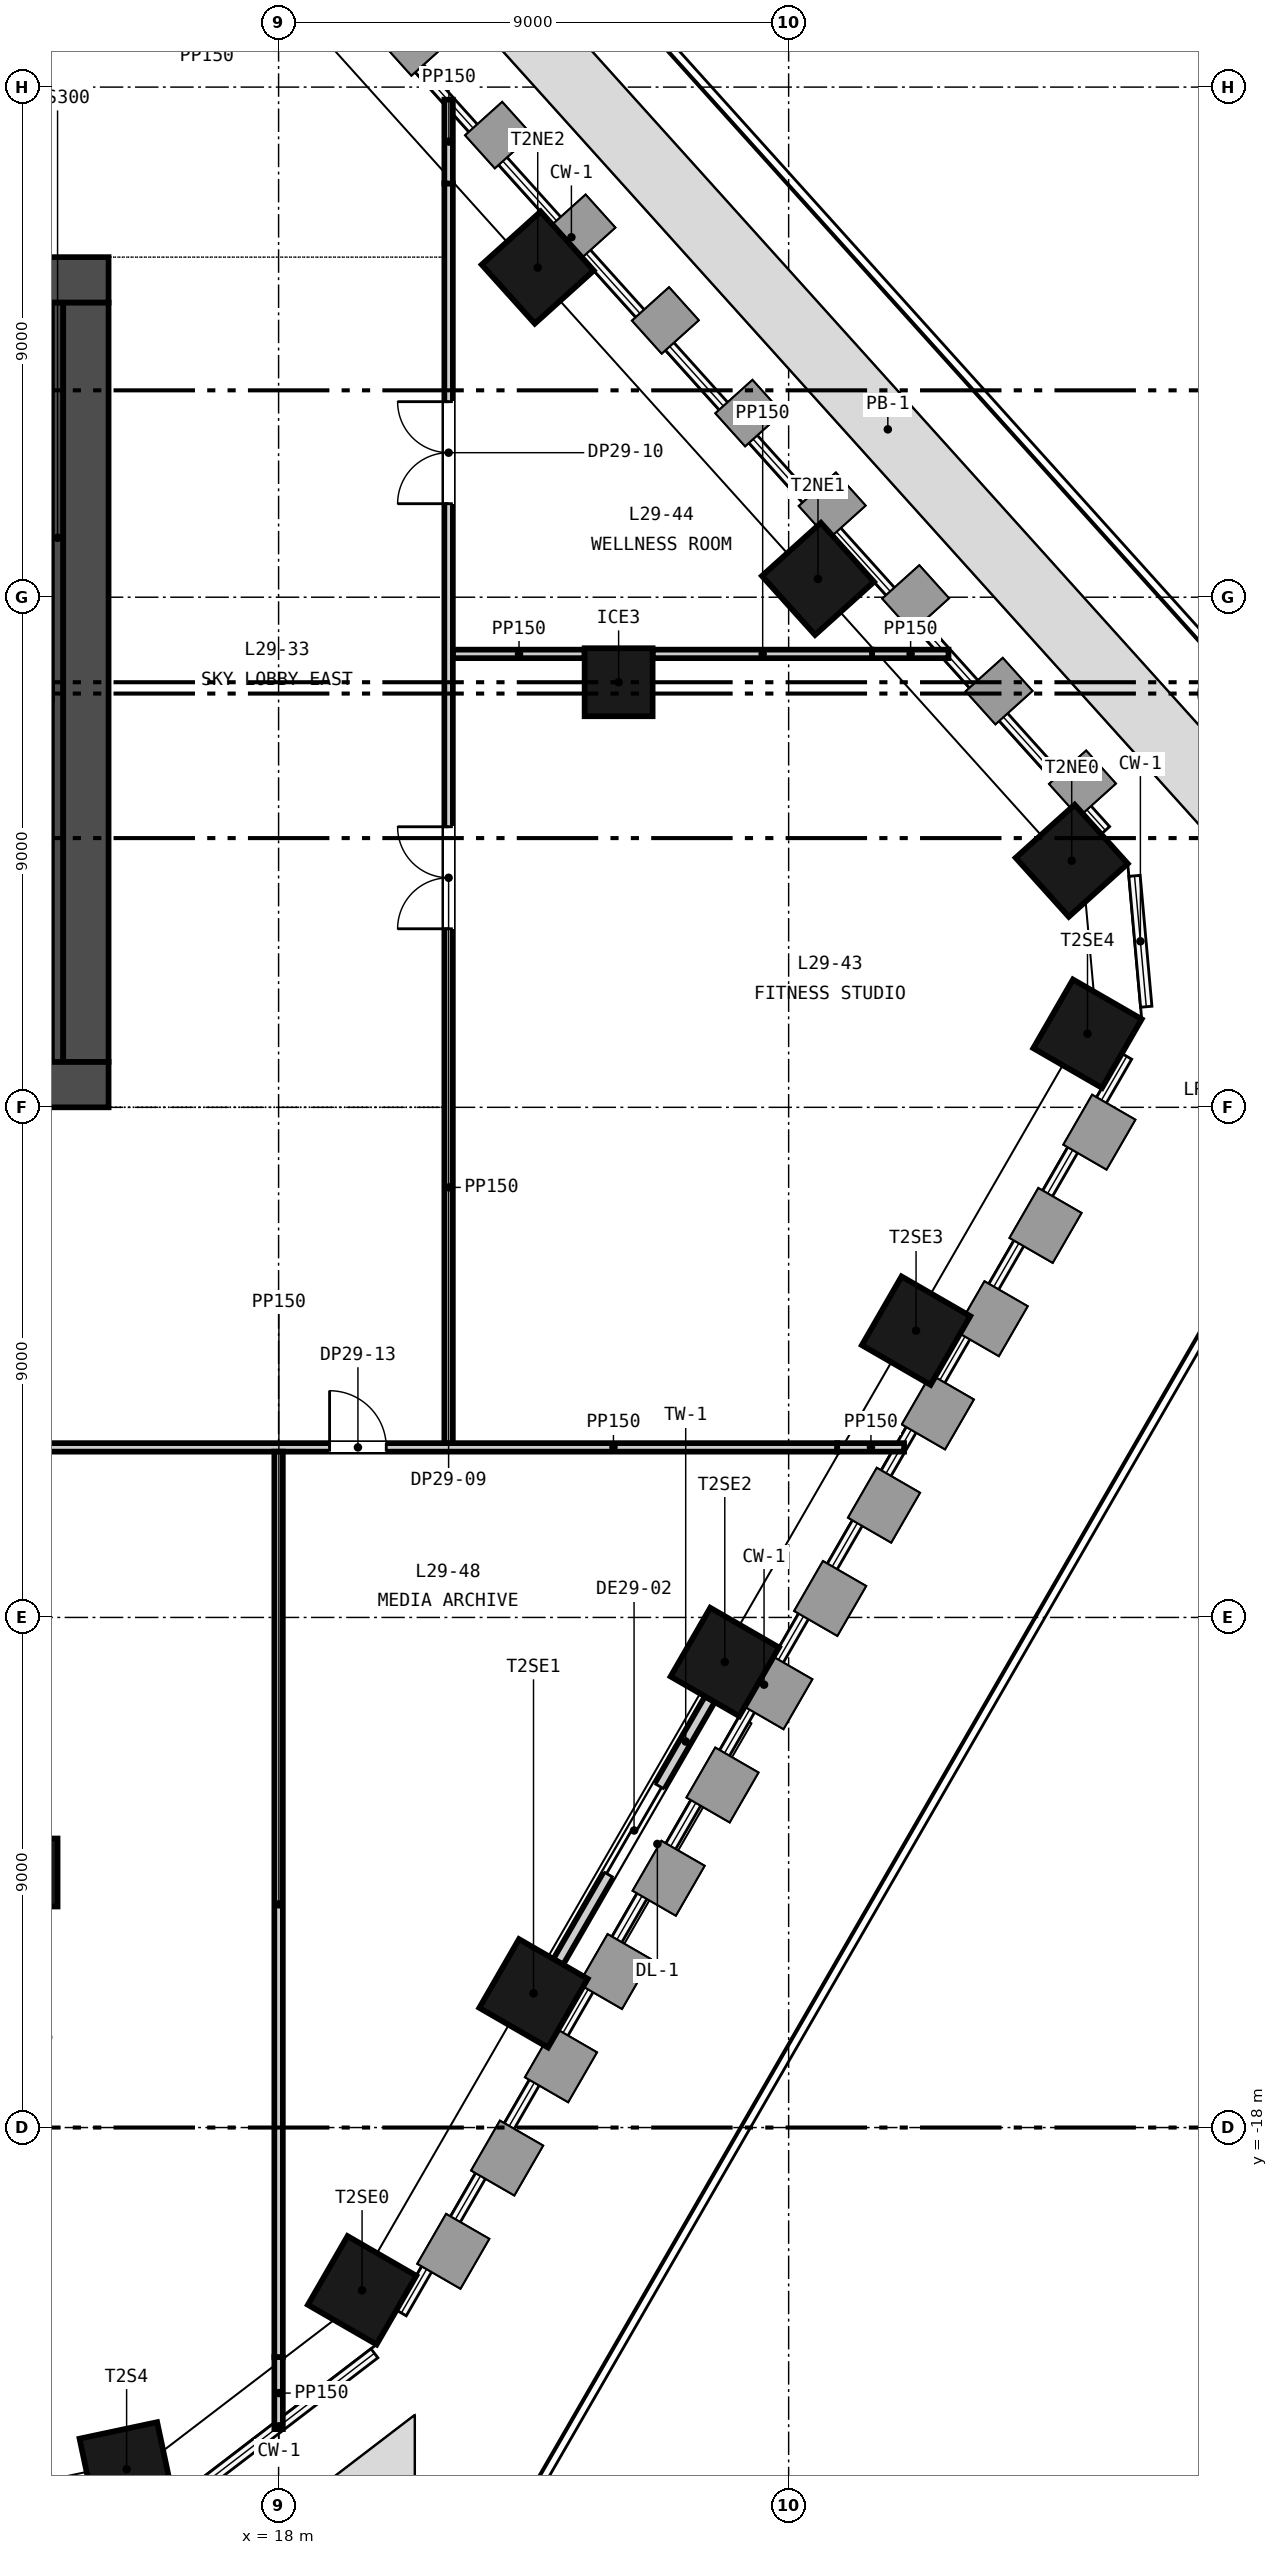
"""IFC4 building model, lengths in metres.
Left out: names, types, materials, properties, quantities, classifications, styles, units other than length and angle.
Written with IfcOpenShell. Run it as: python <this file> out.ifc"""

import sys

from ifc_helpers import new_model, si_unit, direction, frame, frame_2d, origin, origin_2d, place, context, subcontext, project, spatial, rectangle, extrude, element, fill, save


model = new_model("IFC4")
c1 = context("Model", 3, precision=1e-05, world=origin(), true_north=direction((0.0, 1.0)))
c2 = subcontext(c1, "Body", "Model", "MODEL_VIEW")
j1 = project(units=[si_unit("LENGTHUNIT", "METRE"), si_unit("PLANEANGLEUNIT", "RADIAN")], contexts=[c1])
p1 = place(None, origin())
s1 = spatial("IfcSite", under=j1, at=p1, CompositionType="ELEMENT")
p2 = place(p1, origin())
s2 = spatial("IfcBuilding", under=s1, at=p2, CompositionType="ELEMENT")
p3 = place(p2, frame((0.0, 0.0, 121.65)))
s3 = spatial("IfcBuildingStorey", under=s2, at=p3, CompositionType="ELEMENT", Elevation=121.65)
p4 = place(p3, frame((-15.0, 0.4, -0.3), z_axis=(0.0, 0.0, 1.0), x_axis=(1.0, 0.0, 0.0)))
e1 = element("IfcWall", 1, at=p4, inside=s3, PredefinedType="SOLIDWALL", context=c2, shape_type="SweptSolid", body=[
    extrude(rectangle(XDim=30.0, YDim=0.8, at=frame_2d((15.0, 0.0))), origin(), (0.0, 0.0, 1.0), 4.65),
])
p5 = place(p4, frame((5.8, 0.0, 0.3)))
e2 = element("IfcOpeningElement", 2, at=p5, cuts=e1, PredefinedType="OPENING", context=c2, shape_type="SweptSolid", body=[
    extrude(rectangle(XDim=2.4, YDim=2.4, at=frame_2d((1.2, 1.2))), frame((0.0, 0.41, 0.0), z_axis=(0.0, -1.0, 0.0), x_axis=(1.0, 0.0, 0.0)), (0.0, 0.0, 1.0), 0.82),
])
p6 = place(p4, frame((13.8, 0.0, 0.3)))
e3 = element("IfcOpeningElement", 3, at=p6, cuts=e1, PredefinedType="OPENING", context=c2, shape_type="SweptSolid", body=[
    extrude(rectangle(XDim=2.4, YDim=2.4, at=frame_2d((1.2, 1.2))), frame((0.0, 0.41, 0.0), z_axis=(0.0, -1.0, 0.0), x_axis=(1.0, 0.0, 0.0)), (0.0, 0.0, 1.0), 0.82),
])
p7 = place(p4, frame((21.8, 0.0, 0.3)))
e4 = element("IfcOpeningElement", 4, at=p7, cuts=e1, PredefinedType="OPENING", context=c2, shape_type="SweptSolid", body=[
    extrude(rectangle(XDim=2.4, YDim=2.4, at=frame_2d((1.2, 1.2))), frame((0.0, 0.41, 0.0), z_axis=(0.0, -1.0, 0.0), x_axis=(1.0, 0.0, 0.0)), (0.0, 0.0, 1.0), 0.82),
])
p8 = place(p4, frame((1.5, 0.0, 0.3)))
e5 = element("IfcOpeningElement", 5, at=p8, cuts=e1, PredefinedType="OPENING", context=c2, shape_type="SweptSolid", body=[
    extrude(rectangle(XDim=1.2, YDim=2.1, at=frame_2d((0.6, 1.05))), frame((0.0, 0.41, 0.0), z_axis=(0.0, -1.0, 0.0), x_axis=(1.0, 0.0, 0.0)), (0.0, 0.0, 1.0), 0.82),
])
p9 = place(p4, frame((27.3, 0.0, 0.3)))
e6 = element("IfcOpeningElement", 6, at=p9, cuts=e1, PredefinedType="OPENING", context=c2, shape_type="SweptSolid", body=[
    extrude(rectangle(XDim=1.2, YDim=2.1, at=frame_2d((0.6, 1.05))), frame((0.0, 0.41, 0.0), z_axis=(0.0, -1.0, 0.0), x_axis=(1.0, 0.0, 0.0)), (0.0, 0.0, 1.0), 0.82),
])
p10 = place(p3, frame((-15.0, 14.6, -0.3), z_axis=(0.0, 0.0, 1.0), x_axis=(1.0, 0.0, 0.0)))
e7 = element("IfcWall", 7, at=p10, inside=s3, PredefinedType="SOLIDWALL", context=c2, shape_type="SweptSolid", body=[
    extrude(rectangle(XDim=30.0, YDim=0.8, at=frame_2d((15.0, 0.0))), origin(), (0.0, 0.0, 1.0), 4.65),
])
p11 = place(p10, frame((9.25, 0.0, 0.3)))
e8 = element("IfcOpeningElement", 8, at=p11, cuts=e7, PredefinedType="OPENING", context=c2, shape_type="SweptSolid", body=[
    extrude(rectangle(XDim=1.5, YDim=2.1, at=frame_2d((0.75, 1.05))), frame((0.0, 0.41, 0.0), z_axis=(0.0, -1.0, 0.0), x_axis=(1.0, 0.0, 0.0)), (0.0, 0.0, 1.0), 0.82),
])
p12 = place(p10, frame((19.4, 0.0, 0.3)))
e9 = element("IfcOpeningElement", 9, at=p12, cuts=e7, PredefinedType="OPENING", context=c2, shape_type="SweptSolid", body=[
    extrude(rectangle(XDim=1.5, YDim=2.1, at=frame_2d((0.75, 1.05))), frame((0.0, 0.41, 0.0), z_axis=(0.0, -1.0, 0.0), x_axis=(1.0, 0.0, 0.0)), (0.0, 0.0, 1.0), 0.82),
])
p13 = place(p10, frame((1.5, 0.0, 0.3)))
e10 = element("IfcOpeningElement", 10, at=p13, cuts=e7, PredefinedType="OPENING", context=c2, shape_type="SweptSolid", body=[
    extrude(rectangle(XDim=1.2, YDim=2.1, at=frame_2d((0.6, 1.05))), frame((0.0, 0.41, 0.0), z_axis=(0.0, -1.0, 0.0), x_axis=(1.0, 0.0, 0.0)), (0.0, 0.0, 1.0), 0.82),
])
p14 = place(p10, frame((27.3, 0.0, 0.3)))
e11 = element("IfcOpeningElement", 11, at=p14, cuts=e7, PredefinedType="OPENING", context=c2, shape_type="SweptSolid", body=[
    extrude(rectangle(XDim=1.2, YDim=2.1, at=frame_2d((0.6, 1.05))), frame((0.0, 0.41, 0.0), z_axis=(0.0, -1.0, 0.0), x_axis=(1.0, 0.0, 0.0)), (0.0, 0.0, 1.0), 0.82),
])
p15 = place(p3, frame((14.6, 0.8, -0.3), z_axis=(0.0, 0.0, 1.0), x_axis=(0.0, 1.0, 0.0)))
e12 = element("IfcWall", 12, at=p15, inside=s3, PredefinedType="SOLIDWALL", context=c2, shape_type="SweptSolid", body=[
    extrude(rectangle(XDim=13.4, YDim=0.8, at=frame_2d((6.7, 0.0))), origin(), (0.0, 0.0, 1.0), 4.65),
])
for number, where, z_axis, x_axis in (
    (13, (15.318, -24.028, -0.3), (0.0, 0.0, 1.0), (0.978, 0.208, 0.0)),
    (14, (19.473, -20.871, -0.3), (0.0, 0.0, 1.0), (0.5, 0.866, 0.0)),
    (15, (22.498, -15.632, -0.3), (0.0, 0.0, 1.0), (0.5, 0.866, 0.0)),
    (16, (25.873, -9.786, -0.3), (0.0, 0.0, 1.0), (0.5, 0.866, 0.0)),
    (17, (29.248, -3.94, -0.3), (0.0, 0.0, 1.0), (0.5, 0.866, 0.0)),
    (18, (32.273, 1.299, -0.3), (0.0, 0.0, 1.0), (0.5, 0.866, 0.0)),
    (19, (31.995, 4.351, -0.3), (0.0, 0.0, 1.0), (-0.669, 0.743, 0.0)),
    (20, (27.518, 9.323, -0.3), (0.0, 0.0, 1.0), (-0.669, 0.743, 0.0)),
    (21, (22.573, 14.816, -0.3), (0.0, 0.0, 1.0), (-0.669, 0.743, 0.0)),
):
    element("IfcColumn", number, at=place(p3, frame(where, z_axis=z_axis, x_axis=x_axis)), inside=s3, PredefinedType="COLUMN", context=c2, shape_type="SweptSolid", body=[
        extrude(rectangle(XDim=1.4, YDim=1.4, at=origin_2d()), origin(), (0.0, 0.0, 1.0), 4.65),
    ])
for number, where, z_axis, x_axis in (
    (22, (13.5, -13.5, -0.3), (0.0, 0.0, 1.0), (1.0, 0.0, 0.0)),
    (23, (24.0, 7.5, -0.3), (0.0, 0.0, 1.0), (1.0, 0.0, 0.0)),
):
    element("IfcColumn", number, at=place(p3, frame(where, z_axis=z_axis, x_axis=x_axis)), inside=s3, PredefinedType="COLUMN", context=c2, shape_type="SweptSolid", body=[
        extrude(rectangle(XDim=1.2, YDim=1.2, at=origin_2d()), origin(), (0.0, 0.0, 1.0), 4.65),
    ])
p16 = place(p3, frame((22.935, -15.076, 0.0), z_axis=(0.0, 0.0, 1.0), x_axis=(0.500001594578, 0.866024483152, 0.0)))
e24 = element("IfcWall", 24, at=p16, inside=s3, PredefinedType="SOLIDWALL", context=c2, shape_type="SweptSolid", body=[
    extrude(rectangle(XDim=5.35, YDim=0.2, at=frame_2d((2.675, 0.0))), origin(), (0.0, 0.0, 1.0), 3.6),
])
p17 = place(p16, frame((1.775, 0.0, 0.0)))
e25 = element("IfcOpeningElement", 25, at=p17, cuts=e24, PredefinedType="OPENING", context=c2, shape_type="SweptSolid", body=[
    extrude(rectangle(XDim=1.8, YDim=2.4, at=frame_2d((0.9, 1.2))), frame((0.0, 0.11, 0.0), z_axis=(0.0, -1.0, 0.0), x_axis=(1.0, 0.0, 0.0)), (0.0, 0.0, 1.0), 0.22),
])
p18 = place(p3, frame((11.05, 7.35, 0.0), z_axis=(0.0, 0.0, 1.0), x_axis=(1.0, 0.0, 0.0)))
e26 = element("IfcWall", 26, at=p18, inside=s3, PredefinedType="SOLIDWALL", context=c2, shape_type="SweptSolid", body=[
    extrude(rectangle(XDim=2.95, YDim=0.3, at=frame_2d((1.475, 0.0))), origin(), (0.0, 0.0, 1.0), 4.35),
])
p19 = place(p3, frame((14.1, 0.8, 0.0), z_axis=(0.0, 0.0, 1.0), x_axis=(0.0, 1.0, 0.0)))
e27 = element("IfcWall", 27, at=p19, inside=s3, PredefinedType="SOLIDWALL", context=c2, shape_type="SweptSolid", body=[
    extrude(rectangle(XDim=13.4, YDim=0.2, at=frame_2d((6.7, 0.0))), origin(), (0.0, 0.0, 1.0), 4.35),
])
p20 = place(p3, frame((8.075, -6.0, 0.0), z_axis=(0.0, 0.0, 1.0), x_axis=(1.0, 0.0, 0.0)))
e28 = element("IfcWall", 28, at=p20, inside=s3, PredefinedType="PARTITIONING", context=c2, shape_type="SweptSolid", body=[
    extrude(rectangle(XDim=19.782, YDim=0.15, at=frame_2d((9.891, 0.0))), origin(), (0.0, 0.0, 1.0), 4.35),
])
p21 = place(p20, frame((4.4, 0.0, 0.0)))
e29 = element("IfcOpeningElement", 29, at=p21, cuts=e28, PredefinedType="OPENING", context=c2, shape_type="SweptSolid", body=[
    extrude(rectangle(XDim=1.0, YDim=2.1, at=frame_2d((0.5, 1.05))), frame((0.0, 0.085, 0.0), z_axis=(0.0, -1.0, 0.0), x_axis=(1.0, 0.0, 0.0)), (0.0, 0.0, 1.0), 0.17),
])
p22 = place(p20, frame((10.825, 0.0, 0.0)))
e30 = element("IfcOpeningElement", 30, at=p22, cuts=e28, PredefinedType="OPENING", context=c2, shape_type="SweptSolid", body=[
    extrude(rectangle(XDim=1.0, YDim=2.1, at=frame_2d((0.5, 1.05))), frame((0.0, 0.085, 0.0), z_axis=(0.0, -1.0, 0.0), x_axis=(1.0, 0.0, 0.0)), (0.0, 0.0, 1.0), 0.17),
])
p23 = place(p3, frame((27.857, -6.0, 0.0), z_axis=(0.0, 0.0, 1.0), x_axis=(1.0, 0.0, 0.0)))
e31 = element("IfcWall", 31, at=p23, inside=s3, PredefinedType="PARTITIONING", context=c2, shape_type="SweptSolid", body=[
    extrude(rectangle(XDim=1.18, YDim=0.15, at=frame_2d((0.59, 0.0))), origin(), (0.0, 0.0, 1.0), 3.6),
])
p24 = place(p3, frame((21.075, 8.0, 0.0), z_axis=(0.0, 0.0, 1.0), x_axis=(1.0, 0.0, 0.0)))
e32 = element("IfcWall", 32, at=p24, inside=s3, PredefinedType="PARTITIONING", context=c2, shape_type="SweptSolid", body=[
    extrude(rectangle(XDim=2.325, YDim=0.15, at=frame_2d((1.163, 0.0))), origin(), (0.0, 0.0, 1.0), 4.35),
])
p25 = place(p3, frame((24.6, 8.0, 0.0), z_axis=(0.0, 0.0, 1.0), x_axis=(1.0, 0.0, 0.0)))
e33 = element("IfcWall", 33, at=p25, inside=s3, PredefinedType="PARTITIONING", context=c2, shape_type="SweptSolid", body=[
    extrude(rectangle(XDim=3.874, YDim=0.15, at=frame_2d((1.937, 0.0))), origin(), (0.0, 0.0, 1.0), 4.35),
])
p26 = place(p3, frame((28.474, 8.0, 0.0), z_axis=(0.0, 0.0, 1.0), x_axis=(1.0, 0.0, 0.0)))
e34 = element("IfcWall", 34, at=p26, inside=s3, PredefinedType="PARTITIONING", context=c2, shape_type="SweptSolid", body=[
    extrude(rectangle(XDim=1.347, YDim=0.15, at=frame_2d((0.674, 0.0))), origin(), (0.0, 0.0, 1.0), 3.6),
])
p27 = place(p3, frame((18.0, -23.321, 0.0), z_axis=(0.0, 0.0, 1.0), x_axis=(0.0, 1.0, 0.0)))
e35 = element("IfcWall", 35, at=p27, inside=s3, PredefinedType="PARTITIONING", context=c2, shape_type="SweptSolid", body=[
    extrude(rectangle(XDim=1.272, YDim=0.15, at=frame_2d((0.636, 0.0))), origin(), (0.0, 0.0, 1.0), 3.6),
])
p28 = place(p3, frame((18.0, -22.049, 0.0), z_axis=(0.0, 0.0, 1.0), x_axis=(0.0, 1.0, 0.0)))
e36 = element("IfcWall", 36, at=p28, inside=s3, PredefinedType="PARTITIONING", context=c2, shape_type="SweptSolid", body=[
    extrude(rectangle(XDim=15.974, YDim=0.15, at=frame_2d((7.987, 0.0))), origin(), (0.0, 0.0, 1.0), 4.35),
])
p29 = place(p3, frame((21.0, -5.925, 0.0), z_axis=(0.0, 0.0, 1.0), x_axis=(0.0, 1.0, 0.0)))
e37 = element("IfcWall", 37, at=p29, inside=s3, PredefinedType="PARTITIONING", context=c2, shape_type="SweptSolid", body=[
    extrude(rectangle(XDim=22.225, YDim=0.15, at=frame_2d((11.113, 0.0))), origin(), (0.0, 0.0, 1.0), 4.35),
])
p30 = place(p29, frame((9.075, 0.0, 0.0)))
e38 = element("IfcOpeningElement", 38, at=p30, cuts=e37, PredefinedType="OPENING", context=c2, shape_type="SweptSolid", body=[
    extrude(rectangle(XDim=1.8, YDim=2.4, at=frame_2d((0.9, 1.2))), frame((0.0, 0.085, 0.0), z_axis=(0.0, -1.0, 0.0), x_axis=(1.0, 0.0, 0.0)), (0.0, 0.0, 1.0), 0.17),
])
p31 = place(p29, frame((16.575, 0.0, 0.0)))
e39 = element("IfcOpeningElement", 39, at=p31, cuts=e37, PredefinedType="OPENING", context=c2, shape_type="SweptSolid", body=[
    extrude(rectangle(XDim=1.8, YDim=2.4, at=frame_2d((0.9, 1.2))), frame((0.0, 0.085, 0.0), z_axis=(0.0, -1.0, 0.0), x_axis=(1.0, 0.0, 0.0)), (0.0, 0.0, 1.0), 0.17),
])
p32 = place(p3, frame((21.0, 16.3, 0.0), z_axis=(0.0, 0.0, 1.0), x_axis=(0.0, 1.0, 0.0)))
e40 = element("IfcWall", 40, at=p32, inside=s3, PredefinedType="PARTITIONING", context=c2, shape_type="SweptSolid", body=[
    extrude(rectangle(XDim=1.478, YDim=0.15, at=frame_2d((0.739, 0.0))), origin(), (0.0, 0.0, 1.0), 3.6),
])
p33 = place(p17, origin())
e41 = element("IfcDoor", 41, at=p33, inside=s3, OperationType="SINGLE_SWING_LEFT", PredefinedType="DOOR", context=c2, shape_type="SweptSolid", body=[
    extrude(rectangle(XDim=1.8, YDim=2.4, at=frame_2d((0.9, 1.2))), frame((0.0, 0.025, 0.0), z_axis=(0.0, -1.0, 0.0), x_axis=(1.0, 0.0, 0.0)), (0.0, 0.0, 1.0), 0.05),
])
fill(e25, e41)
p34 = place(p30, origin())
e42 = element("IfcDoor", 42, at=p34, inside=s3, OperationType="SINGLE_SWING_LEFT", PredefinedType="DOOR", context=c2, shape_type="SweptSolid", body=[
    extrude(rectangle(XDim=1.8, YDim=2.4, at=frame_2d((0.9, 1.2))), frame((0.0, 0.025, 0.0), z_axis=(0.0, -1.0, 0.0), x_axis=(1.0, 0.0, 0.0)), (0.0, 0.0, 1.0), 0.05),
])
fill(e38, e42)
p35 = place(p31, origin())
e43 = element("IfcDoor", 43, at=p35, inside=s3, OperationType="SINGLE_SWING_LEFT", PredefinedType="DOOR", context=c2, shape_type="SweptSolid", body=[
    extrude(rectangle(XDim=1.8, YDim=2.4, at=frame_2d((0.9, 1.2))), frame((0.0, 0.025, 0.0), z_axis=(0.0, -1.0, 0.0), x_axis=(1.0, 0.0, 0.0)), (0.0, 0.0, 1.0), 0.05),
])
fill(e39, e43)
p36 = place(p22, origin())
e44 = element("IfcDoor", 44, at=p36, inside=s3, OperationType="SINGLE_SWING_LEFT", PredefinedType="DOOR", context=c2, shape_type="SweptSolid", body=[
    extrude(rectangle(XDim=1.0, YDim=2.1, at=frame_2d((0.5, 1.05))), frame((0.0, 0.025, 0.0), z_axis=(0.0, -1.0, 0.0), x_axis=(1.0, 0.0, 0.0)), (0.0, 0.0, 1.0), 0.05),
])
fill(e30, e44)
save(model, sys.argv[1])
